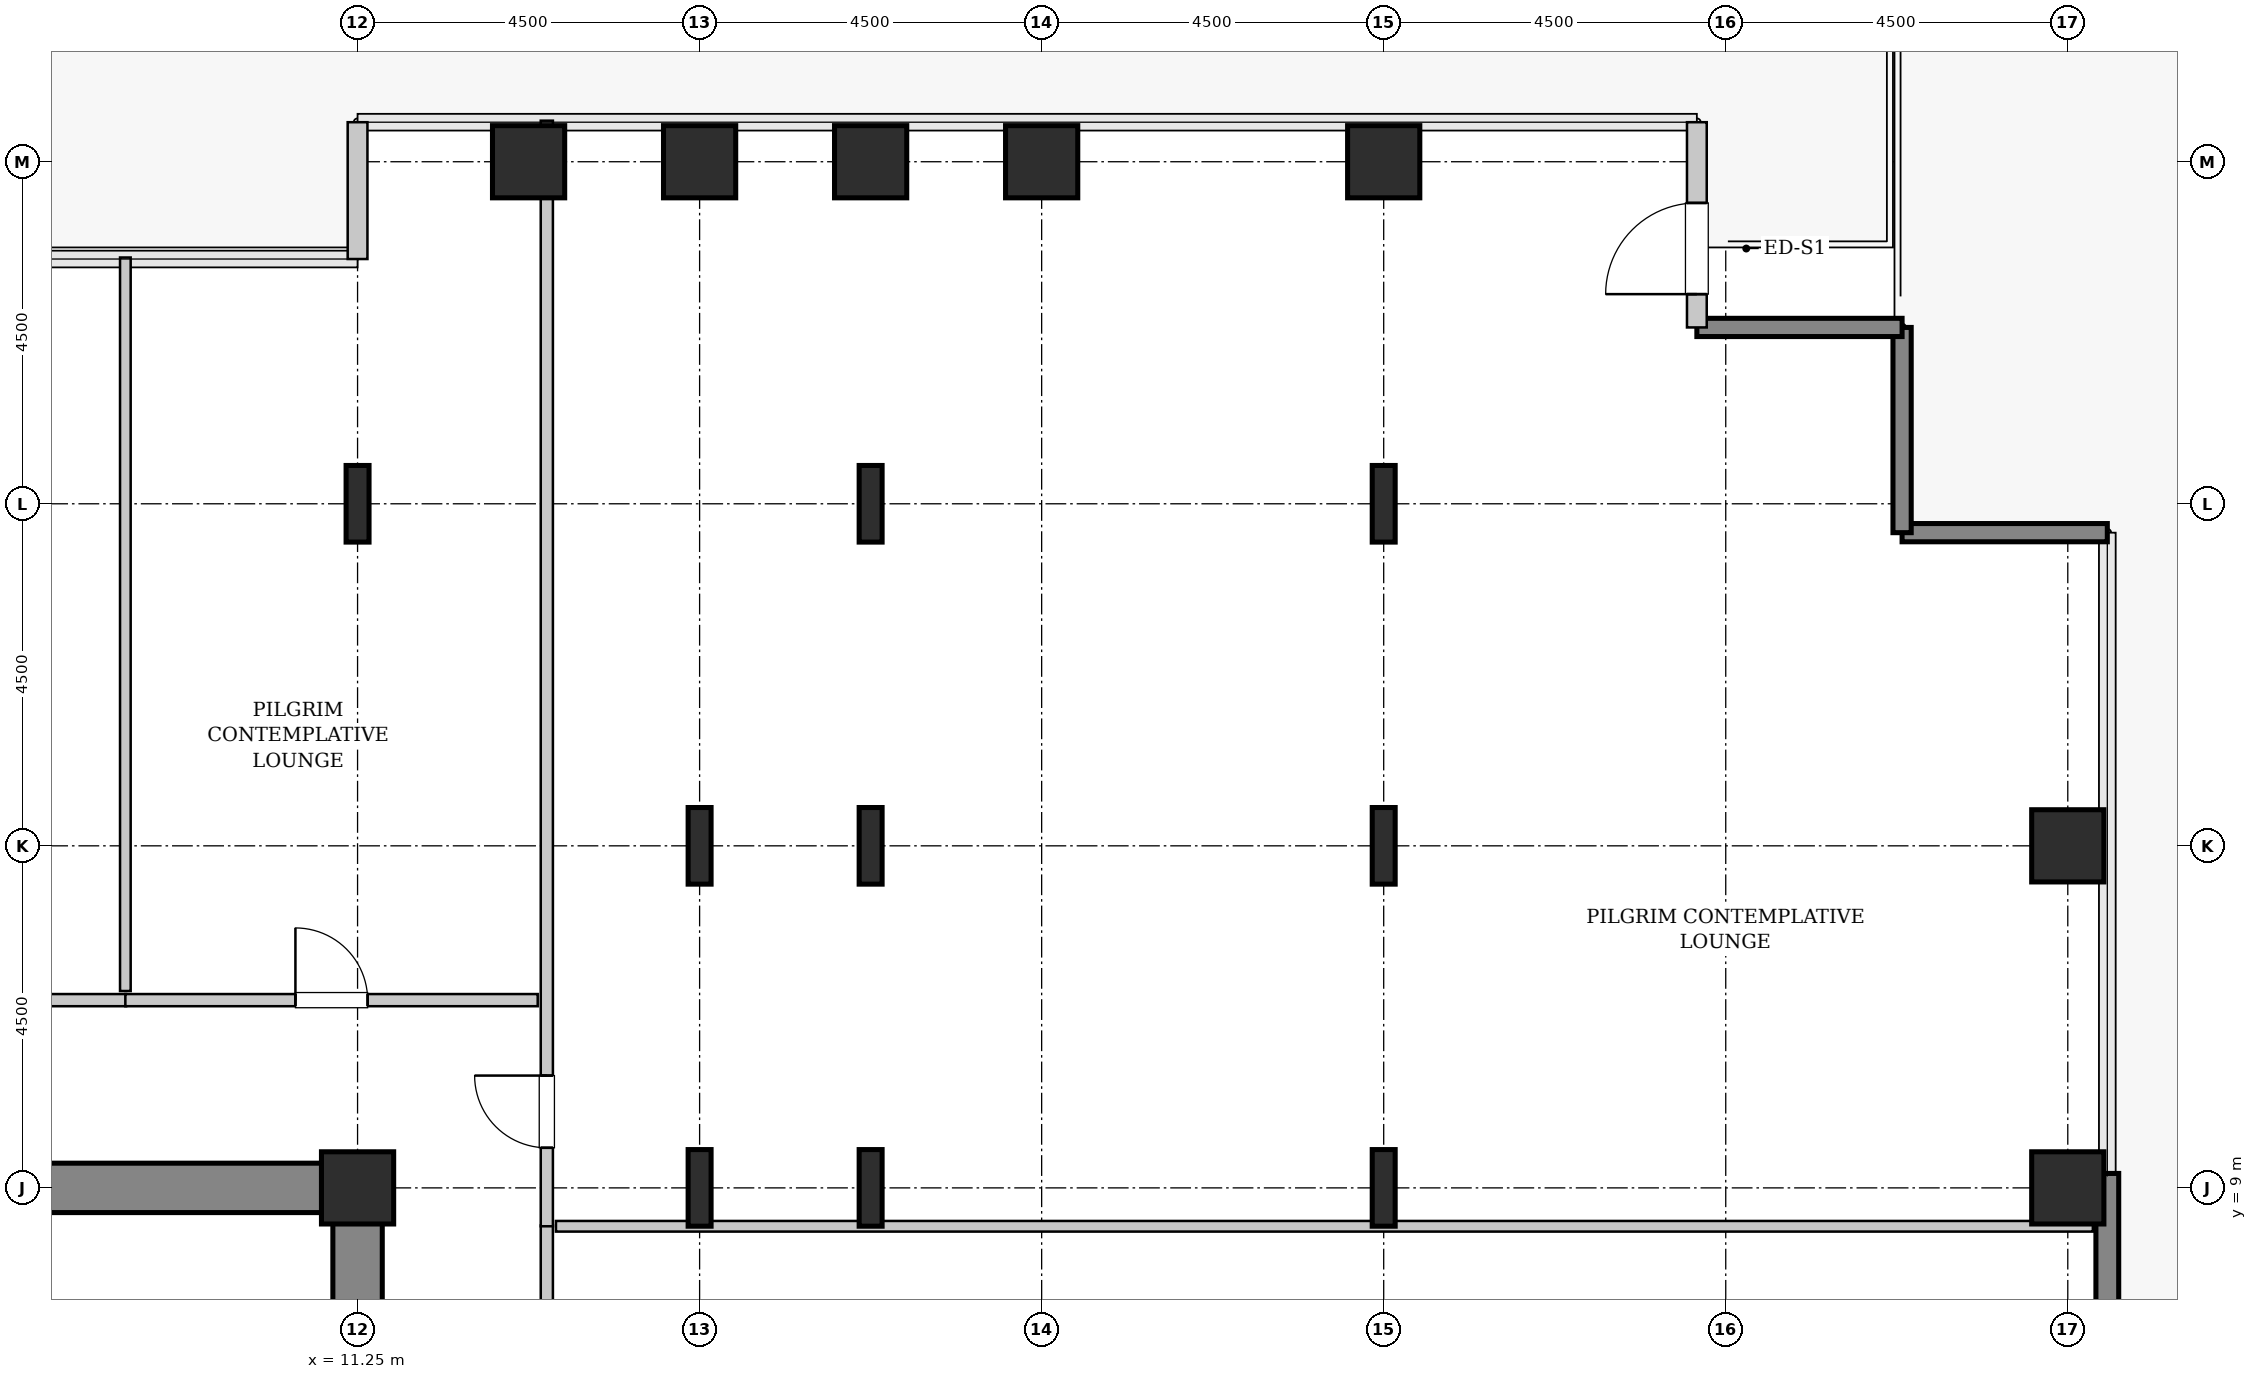
"""IFC4 building model, lengths in metres.
Left out: names, types, materials, properties, quantities, classifications, styles, units other than length and angle.
Written with IfcOpenShell. Run it as: python <this file> out.ifc"""

import sys

from ifc_helpers import new_model, si_unit, direction, frame, frame_2d, origin, origin_2d, place, context, subcontext, project, spatial, rectangle, hollow_rectangle, i_section, extrude, source, transform, mapped, element, fill, save


model = new_model("IFC4")
c1 = context("Model", 3, precision=1e-05, world=origin(), true_north=direction((0.0, 1.0)))
c2 = subcontext(c1, "Body", "Model", "MODEL_VIEW")
j1 = project(units=[si_unit("LENGTHUNIT", "METRE"), si_unit("PLANEANGLEUNIT", "RADIAN")], contexts=[c1])
p1 = place(None, origin())
s1 = spatial("IfcSite", under=j1, at=p1, CompositionType="ELEMENT")
p2 = place(p1, origin())
s2 = spatial("IfcBuilding", under=s1, at=p2, CompositionType="ELEMENT")
p3 = place(p2, frame((0.0, 0.0, 33.0)))
s3 = spatial("IfcBuildingStorey", under=s2, at=p3, CompositionType="ELEMENT", Elevation=33.0)
m1 = source(origin(), c2, "Body", "SweptSolid", [
    extrude(rectangle(XDim=10.025, YDim=0.65, at=frame_2d((5.012, 0.0))), origin(), (0.0, 0.0, 1.0), 3.8),
])
p4 = place(p3, frame((1.55, 9.0, 0.0), z_axis=(0.0, 0.0, 1.0), x_axis=(1.0, 0.0, 0.0)))
e1 = element("IfcWall", 1, at=p4, inside=s3, PredefinedType="SHEAR", context=c2, shape_type="MappedRepresentation", body=[
    mapped(m1, transform((0.0, 0.0, 0.0), x_axis=(1.0, 0.0, 0.0), y_axis=(0.0, 1.0, 0.0), z_axis=(0.0, 0.0, 1.0), scale=1.0)),
])
m2 = source(origin(), c2, "Body", "SweptSolid", [
    extrude(rectangle(XDim=7.325, YDim=0.65, at=frame_2d((3.663, 0.0))), origin(), (0.0, 0.0, 1.0), 3.8),
])
p5 = place(p3, frame((11.25, 1.35, 0.0), z_axis=(0.0, 0.0, 1.0), x_axis=(0.0, 1.0, 0.0)))
e2 = element("IfcWall", 2, at=p5, inside=s3, PredefinedType="SHEAR", context=c2, shape_type="MappedRepresentation", body=[
    mapped(m2, transform((0.0, 0.0, 0.0), x_axis=(1.0, 0.0, 0.0), y_axis=(0.0, 1.0, 0.0), z_axis=(0.0, 0.0, 1.0), scale=1.0)),
])
m3 = source(origin(), c2, "Body", "SweptSolid", [
    extrude(hollow_rectangle(XDim=0.95, YDim=0.95, WallThickness=0.045, InnerFilletRadius=0.045, OuterFilletRadius=0.09, at=origin_2d()), origin(), (0.0, 0.0, 1.0), 3.8),
])
p6 = place(p3, frame((11.25, 9.0, 0.0), z_axis=(0.0, 0.0, 1.0), x_axis=(1.0, 0.0, 0.0)))
e3 = element("IfcColumn", 3, at=p6, inside=s3, PredefinedType="COLUMN", context=c2, shape_type="MappedRepresentation", body=[
    mapped(m3, transform((0.0, 0.0, 0.0), x_axis=(1.0, 0.0, 0.0), y_axis=(0.0, 1.0, 0.0), z_axis=(0.0, 0.0, 1.0), scale=1.0)),
])
m4 = source(origin(), c2, "Body", "SweptSolid", [
    extrude(i_section(OverallWidth=0.302, OverallDepth=1.008, WebThickness=0.021, FlangeThickness=0.04, FilletRadius=0.03, at=origin_2d()), origin(), (0.0, 0.0, 1.0), 3.8),
])
p7 = place(p3, frame((11.25, 18.0, 0.0), z_axis=(0.0, 0.0, 1.0), x_axis=(1.0, 0.0, 0.0)))
e4 = element("IfcColumn", 4, at=p7, inside=s3, PredefinedType="COLUMN", context=c2, shape_type="MappedRepresentation", body=[
    mapped(m4, transform((0.0, 0.0, 0.0), x_axis=(1.0, 0.0, 0.0), y_axis=(0.0, 1.0, 0.0), z_axis=(0.0, 0.0, 1.0), scale=1.0)),
])
m5 = source(origin(), c2, "Body", "SweptSolid", [
    extrude(hollow_rectangle(XDim=0.95, YDim=0.95, WallThickness=0.045, InnerFilletRadius=0.045, OuterFilletRadius=0.09, at=origin_2d()), origin(), (0.0, 0.0, 1.0), 3.8),
])
p8 = place(p3, frame((13.5, 22.5, 0.0), z_axis=(0.0, 0.0, 1.0), x_axis=(1.0, 0.0, 0.0)))
e5 = element("IfcColumn", 5, at=p8, inside=s3, PredefinedType="COLUMN", context=c2, shape_type="MappedRepresentation", body=[
    mapped(m5, transform((0.0, 0.0, 0.0), x_axis=(1.0, 0.0, 0.0), y_axis=(0.0, 1.0, 0.0), z_axis=(0.0, 0.0, 1.0), scale=1.0)),
])
for number, where, z_axis, x_axis in (
    (6, (15.75, 9.0, 0.0), (0.0, 0.0, 1.0), (1.0, 0.0, 0.0)),
    (7, (15.75, 13.5, 0.0), (0.0, 0.0, 1.0), (1.0, 0.0, 0.0)),
):
    element("IfcColumn", number, at=place(p3, frame(where, z_axis=z_axis, x_axis=x_axis)), inside=s3, PredefinedType="COLUMN", context=c2, shape_type="MappedRepresentation", body=[
        mapped(m4, transform((0.0, 0.0, 0.0), x_axis=(1.0, 0.0, 0.0), y_axis=(0.0, 1.0, 0.0), z_axis=(0.0, 0.0, 1.0), scale=1.0)),
    ])
p9 = place(p3, frame((15.75, 22.5, 0.0), z_axis=(0.0, 0.0, 1.0), x_axis=(1.0, 0.0, 0.0)))
e8 = element("IfcColumn", 8, at=p9, inside=s3, PredefinedType="COLUMN", context=c2, shape_type="MappedRepresentation", body=[
    mapped(m5, transform((0.0, 0.0, 0.0), x_axis=(1.0, 0.0, 0.0), y_axis=(0.0, 1.0, 0.0), z_axis=(0.0, 0.0, 1.0), scale=1.0)),
])
for number, where, z_axis, x_axis in (
    (9, (18.0, 9.0, 0.0), (0.0, 0.0, 1.0), (1.0, 0.0, 0.0)),
    (10, (18.0, 13.5, 0.0), (0.0, 0.0, 1.0), (1.0, 0.0, 0.0)),
    (11, (18.0, 18.0, 0.0), (0.0, 0.0, 1.0), (1.0, 0.0, 0.0)),
):
    element("IfcColumn", number, at=place(p3, frame(where, z_axis=z_axis, x_axis=x_axis)), inside=s3, PredefinedType="COLUMN", context=c2, shape_type="MappedRepresentation", body=[
        mapped(m4, transform((0.0, 0.0, 0.0), x_axis=(1.0, 0.0, 0.0), y_axis=(0.0, 1.0, 0.0), z_axis=(0.0, 0.0, 1.0), scale=1.0)),
    ])
for number, where, z_axis, x_axis in (
    (12, (18.0, 22.5, 0.0), (0.0, 0.0, 1.0), (1.0, 0.0, 0.0)),
    (13, (20.25, 22.5, 0.0), (0.0, 0.0, 1.0), (1.0, 0.0, 0.0)),
):
    element("IfcColumn", number, at=place(p3, frame(where, z_axis=z_axis, x_axis=x_axis)), inside=s3, PredefinedType="COLUMN", context=c2, shape_type="MappedRepresentation", body=[
        mapped(m5, transform((0.0, 0.0, 0.0), x_axis=(1.0, 0.0, 0.0), y_axis=(0.0, 1.0, 0.0), z_axis=(0.0, 0.0, 1.0), scale=1.0)),
    ])
for number, where, z_axis, x_axis in (
    (14, (24.75, 9.0, 0.0), (0.0, 0.0, 1.0), (1.0, 0.0, 0.0)),
    (15, (24.75, 13.5, 0.0), (0.0, 0.0, 1.0), (1.0, 0.0, 0.0)),
    (16, (24.75, 18.0, 0.0), (0.0, 0.0, 1.0), (1.0, 0.0, 0.0)),
):
    element("IfcColumn", number, at=place(p3, frame(where, z_axis=z_axis, x_axis=x_axis)), inside=s3, PredefinedType="COLUMN", context=c2, shape_type="MappedRepresentation", body=[
        mapped(m4, transform((0.0, 0.0, 0.0), x_axis=(1.0, 0.0, 0.0), y_axis=(0.0, 1.0, 0.0), z_axis=(0.0, 0.0, 1.0), scale=1.0)),
    ])
for number, where, z_axis, x_axis in (
    (17, (24.75, 22.5, 0.0), (0.0, 0.0, 1.0), (1.0, 0.0, 0.0)),
    (18, (33.75, 9.0, 0.0), (0.0, 0.0, 1.0), (1.0, 0.0, 0.0)),
    (19, (33.75, 13.5, 0.0), (0.0, 0.0, 1.0), (1.0, 0.0, 0.0)),
):
    element("IfcColumn", number, at=place(p3, frame(where, z_axis=z_axis, x_axis=x_axis)), inside=s3, PredefinedType="COLUMN", context=c2, shape_type="MappedRepresentation", body=[
        mapped(m5, transform((0.0, 0.0, 0.0), x_axis=(1.0, 0.0, 0.0), y_axis=(0.0, 1.0, 0.0), z_axis=(0.0, 0.0, 1.0), scale=1.0)),
    ])
m6 = source(origin(), c2, "Body", "SweptSolid", [
    extrude(rectangle(XDim=4.88, YDim=0.3, at=frame_2d((2.44, 0.0))), origin(), (0.0, 0.0, 1.0), 3.55),
])
p10 = place(p3, frame((34.27, 4.31, 0.0), z_axis=(0.0, 0.0, 1.0), x_axis=(0.0, 1.0, 0.0)))
e20 = element("IfcWall", 20, at=p10, inside=s3, PredefinedType="SHEAR", context=c2, shape_type="MappedRepresentation", body=[
    mapped(m6, transform((0.0, 0.0, 0.0), x_axis=(1.0, 0.0, 0.0), y_axis=(0.0, 1.0, 0.0), z_axis=(0.0, 0.0, 1.0), scale=1.0)),
])
m7 = source(origin(), c2, "Body", "SweptSolid", [
    extrude(rectangle(XDim=2.7, YDim=0.24, at=frame_2d((1.35, 0.0))), origin(), (0.0, 0.0, 1.0), 3.55),
])
for number, where, z_axis, x_axis in (
    (21, (34.27, 17.62, 0.0), (0.0, 0.0, 1.0), (-1.0, 0.0, 0.0)),
    (22, (31.57, 17.62, 0.0), (0.0, 0.0, 1.0), (0.0, 1.0, 0.0)),
    (23, (31.57, 20.32, 0.0), (0.0, 0.0, 1.0), (-1.0, 0.0, 0.0)),
):
    element("IfcWall", number, at=place(p3, frame(where, z_axis=z_axis, x_axis=x_axis)), inside=s3, PredefinedType="SHEAR", context=c2, shape_type="MappedRepresentation", body=[
        mapped(m7, transform((0.0, 0.0, 0.0), x_axis=(1.0, 0.0, 0.0), y_axis=(0.0, 1.0, 0.0), z_axis=(0.0, 0.0, 1.0), scale=1.0)),
    ])
m8 = source(origin(), c2, "Body", "SweptSolid", [
    extrude(rectangle(XDim=2.7, YDim=0.26, at=frame_2d((1.35, 0.0))), origin(), (0.0, 0.0, 1.0), 3.55),
])
p11 = place(p3, frame((28.87, 20.32, 0.0), z_axis=(0.0, 0.0, 1.0), x_axis=(0.0, 1.0, 0.0)))
e24 = element("IfcWall", 24, at=p11, inside=s3, PredefinedType="SOLIDWALL", context=c2, shape_type="MappedRepresentation", body=[
    mapped(m8, transform((0.0, 0.0, 0.0), x_axis=(1.0, 0.0, 0.0), y_axis=(0.0, 1.0, 0.0), z_axis=(0.0, 0.0, 1.0), scale=1.0)),
])
p12 = place(p11, frame((0.438, 0.0, 0.0)))
e25 = element("IfcOpeningElement", 25, at=p12, cuts=e24, PredefinedType="OPENING", context=c2, shape_type="SweptSolid", body=[
    extrude(rectangle(XDim=1.2, YDim=2.2, at=frame_2d((0.6, 1.1))), frame((0.0, 0.14, 0.0), z_axis=(0.0, -1.0, 0.0), x_axis=(1.0, 0.0, 0.0)), (0.0, 0.0, 1.0), 0.28),
])
m9 = source(origin(), c2, "Body", "SweptSolid", [
    extrude(rectangle(XDim=1.8, YDim=0.26, at=frame_2d((0.9, 0.0))), origin(), (0.0, 0.0, 1.0), 3.55),
])
p13 = place(p3, frame((11.25, 23.02, 0.0), z_axis=(0.0, 0.0, 1.0), x_axis=(0.0, -1.0, 0.0)))
e26 = element("IfcWall", 26, at=p13, inside=s3, PredefinedType="SOLIDWALL", context=c2, shape_type="MappedRepresentation", body=[
    mapped(m9, transform((0.0, 0.0, 0.0), x_axis=(1.0, 0.0, 0.0), y_axis=(0.0, 1.0, 0.0), z_axis=(0.0, 0.0, 1.0), scale=1.0)),
])
m10 = source(origin(), c2, "Body", "SweptSolid", [
    extrude(rectangle(XDim=3.4, YDim=0.16, at=frame_2d((1.7, 0.0))), origin(), (0.0, 0.0, 1.0), 3.535),
])
p14 = place(p3, frame((13.74, 5.105, 0.0), z_axis=(0.0, 0.0, 1.0), x_axis=(0.0, 1.0, 0.0)))
e27 = element("IfcWall", 27, at=p14, inside=s3, PredefinedType="PARTITIONING", context=c2, shape_type="MappedRepresentation", body=[
    mapped(m10, transform((0.0, 0.0, 0.0), x_axis=(1.0, 0.0, 0.0), y_axis=(0.0, 1.0, 0.0), z_axis=(0.0, 0.0, 1.0), scale=1.0)),
])
p15 = place(p14, frame((1.225, 0.0, 0.0)))
e28 = element("IfcOpeningElement", 28, at=p15, cuts=e27, PredefinedType="OPENING", context=c2, shape_type="SweptSolid", body=[
    extrude(rectangle(XDim=0.95, YDim=2.1, at=frame_2d((0.475, 1.05))), frame((0.0, 0.09, 0.0), z_axis=(0.0, -1.0, 0.0), x_axis=(1.0, 0.0, 0.0)), (0.0, 0.0, 1.0), 0.18),
])
m11 = source(origin(), c2, "Body", "SweptSolid", [
    extrude(rectangle(XDim=20.22, YDim=0.14, at=frame_2d((10.11, 0.0))), origin(), (0.0, 0.0, 1.0), 2.825),
])
p16 = place(p3, frame((13.86, 8.495, 0.0), z_axis=(0.0, 0.0, 1.0), x_axis=(1.0, 0.0, 0.0)))
e29 = element("IfcWall", 29, at=p16, inside=s3, PredefinedType="PARTITIONING", context=c2, shape_type="MappedRepresentation", body=[
    mapped(m11, transform((0.0, 0.0, 0.0), x_axis=(1.0, 0.0, 0.0), y_axis=(0.0, 1.0, 0.0), z_axis=(0.0, 0.0, 1.0), scale=1.0)),
])
m12 = source(origin(), c2, "Body", "SweptSolid", [
    extrude(rectangle(XDim=14.545, YDim=0.16, at=frame_2d((7.272, 0.0))), origin(), (0.0, 0.0, 1.0), 3.535),
])
p17 = place(p3, frame((13.74, 8.495, 0.0), z_axis=(0.0, 0.0, 1.0), x_axis=(0.0, 1.0, 0.0)))
e30 = element("IfcWall", 30, at=p17, inside=s3, PredefinedType="PARTITIONING", context=c2, shape_type="MappedRepresentation", body=[
    mapped(m12, transform((0.0, 0.0, 0.0), x_axis=(1.0, 0.0, 0.0), y_axis=(0.0, 1.0, 0.0), z_axis=(0.0, 0.0, 1.0), scale=1.0)),
])
p18 = place(p17, frame((1.032, 0.0, 0.0)))
e31 = element("IfcOpeningElement", 31, at=p18, cuts=e30, PredefinedType="OPENING", context=c2, shape_type="SweptSolid", body=[
    extrude(rectangle(XDim=0.95, YDim=2.1, at=frame_2d((0.475, 1.05))), frame((0.0, 0.09, 0.0), z_axis=(0.0, -1.0, 0.0), x_axis=(1.0, 0.0, 0.0)), (0.0, 0.0, 1.0), 0.18),
])
m13 = source(origin(), c2, "Body", "SweptSolid", [
    extrude(rectangle(XDim=5.81, YDim=0.16, at=frame_2d((2.905, 0.0))), origin(), (0.0, 0.0, 1.0), 3.535),
])
p19 = place(p3, frame((2.395, 11.47, 0.0), z_axis=(0.0, 0.0, 1.0), x_axis=(1.0, 0.0, 0.0)))
e32 = element("IfcWall", 32, at=p19, inside=s3, PredefinedType="PARTITIONING", context=c2, shape_type="MappedRepresentation", body=[
    mapped(m13, transform((0.0, 0.0, 0.0), x_axis=(1.0, 0.0, 0.0), y_axis=(0.0, 1.0, 0.0), z_axis=(0.0, 0.0, 1.0), scale=1.0)),
])
p20 = place(p19, frame((2.43, 0.0, 0.0)))
e33 = element("IfcOpeningElement", 33, at=p20, cuts=e32, PredefinedType="OPENING", context=c2, shape_type="SweptSolid", body=[
    extrude(rectangle(XDim=0.95, YDim=2.1, at=frame_2d((0.475, 1.05))), frame((0.0, 0.09, 0.0), z_axis=(0.0, -1.0, 0.0), x_axis=(1.0, 0.0, 0.0)), (0.0, 0.0, 1.0), 0.18),
])
m14 = source(origin(), c2, "Body", "SweptSolid", [
    extrude(rectangle(XDim=9.65, YDim=0.14, at=frame_2d((4.825, 0.0))), origin(), (0.0, 0.0, 1.0), 3.535),
])
p21 = place(p3, frame((8.195, 11.59, 0.0), z_axis=(0.0, 0.0, 1.0), x_axis=(0.0, 1.0, 0.0)))
e34 = element("IfcWall", 34, at=p21, inside=s3, PredefinedType="PARTITIONING", context=c2, shape_type="MappedRepresentation", body=[
    mapped(m14, transform((0.0, 0.0, 0.0), x_axis=(1.0, 0.0, 0.0), y_axis=(0.0, 1.0, 0.0), z_axis=(0.0, 0.0, 1.0), scale=1.0)),
])
m15 = source(origin(), c2, "Body", "SweptSolid", [
    extrude(rectangle(XDim=5.425, YDim=0.16, at=frame_2d((2.712, 0.0))), origin(), (0.0, 0.0, 1.0), 3.535),
])
p22 = place(p3, frame((8.195, 11.47, 0.0), z_axis=(0.0, 0.0, 1.0), x_axis=(1.0, 0.0, 0.0)))
e35 = element("IfcWall", 35, at=p22, inside=s3, PredefinedType="PARTITIONING", context=c2, shape_type="MappedRepresentation", body=[
    mapped(m15, transform((0.0, 0.0, 0.0), x_axis=(1.0, 0.0, 0.0), y_axis=(0.0, 1.0, 0.0), z_axis=(0.0, 0.0, 1.0), scale=1.0)),
])
p23 = place(p22, frame((2.238, 0.0, 0.0)))
e36 = element("IfcOpeningElement", 36, at=p23, cuts=e35, PredefinedType="OPENING", context=c2, shape_type="SweptSolid", body=[
    extrude(rectangle(XDim=0.95, YDim=2.1, at=frame_2d((0.475, 1.05))), frame((0.0, 0.09, 0.0), z_axis=(0.0, -1.0, 0.0), x_axis=(1.0, 0.0, 0.0)), (0.0, 0.0, 1.0), 0.18),
])
m16 = source(origin(), c2, "Body", "SweptSolid", [
    extrude(rectangle(XDim=1.2, YDim=2.2, at=frame_2d((0.6, 1.1))), frame((0.0, 0.025, 0.0), z_axis=(0.0, -1.0, 0.0), x_axis=(1.0, 0.0, 0.0)), (0.0, 0.0, 1.0), 0.05),
])
p24 = place(p12, origin())
e37 = element("IfcDoor", 37, at=p24, inside=s3, OperationType="SINGLE_SWING_LEFT", PredefinedType="DOOR", context=c2, shape_type="MappedRepresentation", body=[
    mapped(m16, transform((0.0, 0.0, 0.0), x_axis=(1.0, 0.0, 0.0), y_axis=(0.0, 1.0, 0.0), z_axis=(0.0, 0.0, 1.0), scale=1.0)),
])
fill(e25, e37)
m17 = source(origin(), c2, "Body", "SweptSolid", [
    extrude(rectangle(XDim=0.95, YDim=2.1, at=frame_2d((0.475, 1.05))), frame((0.0, 0.025, 0.0), z_axis=(0.0, -1.0, 0.0), x_axis=(1.0, 0.0, 0.0)), (0.0, 0.0, 1.0), 0.05),
])
p25 = place(p18, origin())
e38 = element("IfcDoor", 38, at=p25, inside=s3, OperationType="SINGLE_SWING_RIGHT", PredefinedType="DOOR", context=c2, shape_type="MappedRepresentation", body=[
    mapped(m17, transform((0.0, 0.0, 0.0), x_axis=(1.0, 0.0, 0.0), y_axis=(0.0, 1.0, 0.0), z_axis=(0.0, 0.0, 1.0), scale=1.0)),
])
fill(e31, e38)
p26 = place(p23, origin())
e39 = element("IfcDoor", 39, at=p26, inside=s3, OperationType="SINGLE_SWING_LEFT", PredefinedType="DOOR", context=c2, shape_type="MappedRepresentation", body=[
    mapped(m17, transform((0.0, 0.0, 0.0), x_axis=(1.0, 0.0, 0.0), y_axis=(0.0, 1.0, 0.0), z_axis=(0.0, 0.0, 1.0), scale=1.0)),
])
fill(e36, e39)
save(model, sys.argv[1])
